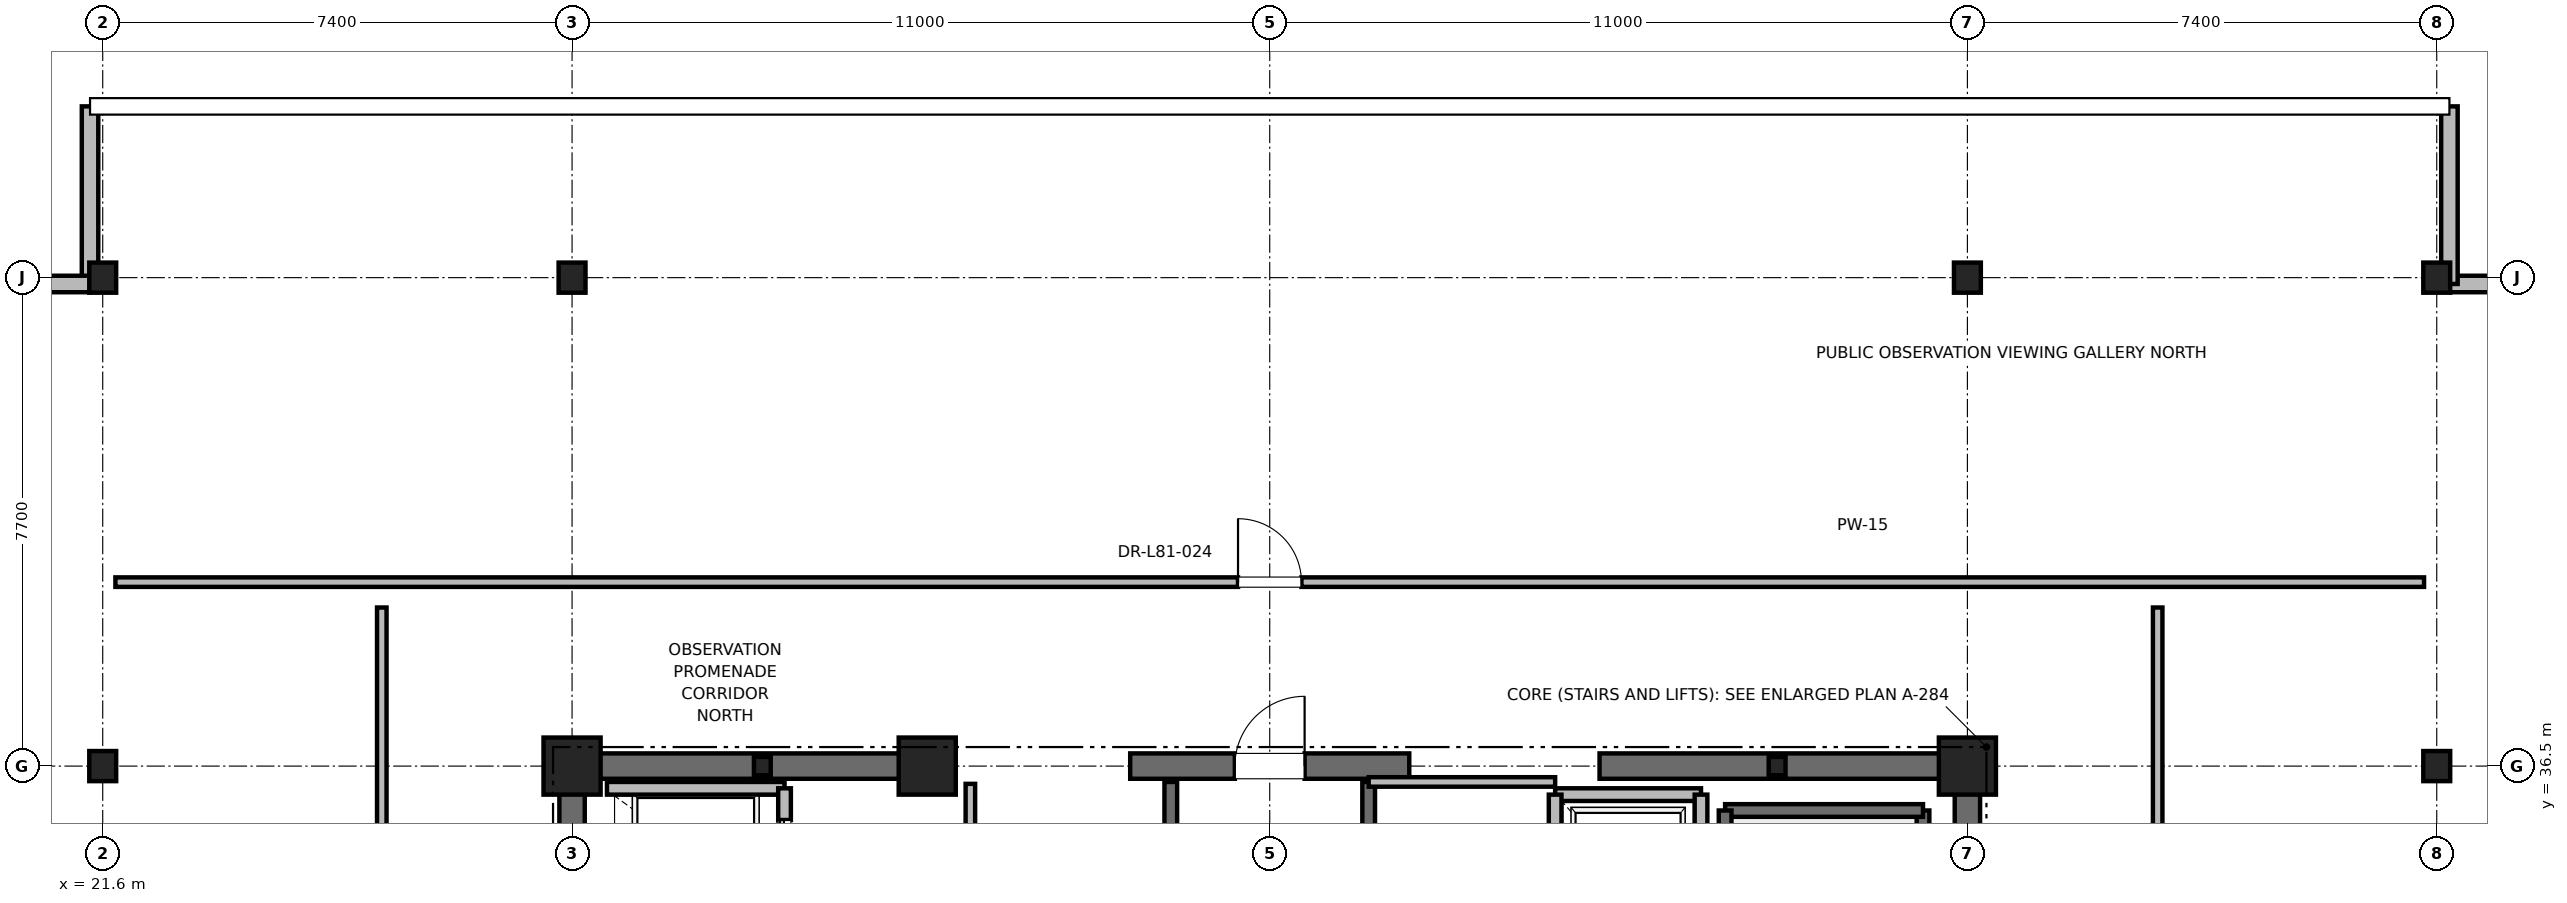
"""IFC4 building model, lengths in metres.
Left out: names, types, materials, properties, quantities, classifications, styles, units other than length and angle.
Written with IfcOpenShell. Run it as: python <this file> out.ifc"""

import sys

from ifc_helpers import new_model, si_unit, direction, frame, frame_2d, origin, origin_2d, place, context, subcontext, project, spatial, rectangle, i_section, extrude, element, fill, save


model = new_model("IFC4")
c1 = context("Model", 3, precision=1e-05, world=origin(), true_north=direction((0.0, 1.0)))
c2 = subcontext(c1, "Body", "Model", "MODEL_VIEW")
j1 = project(units=[si_unit("LENGTHUNIT", "METRE"), si_unit("PLANEANGLEUNIT", "RADIAN")], contexts=[c1])
p1 = place(None, origin())
s1 = spatial("IfcSite", under=j1, at=p1, CompositionType="ELEMENT")
p2 = place(p1, origin())
s2 = spatial("IfcBuilding", under=s1, at=p2, CompositionType="ELEMENT")
p3 = place(p2, frame((0.0, 0.0, 348.8)))
s3 = spatial("IfcBuildingStorey", under=s2, at=p3, CompositionType="ELEMENT", Elevation=348.8)
for number, where, z_axis, x_axis in (
    (1, (29.0, 44.2, 0.0), (0.0, 0.0, 1.0), (1.0, 0.0, 0.0)),
    (2, (51.0, 44.2, 0.0), (0.0, 0.0, 1.0), (1.0, 0.0, 0.0)),
    (3, (21.6, 36.5, 0.0), (0.0, 0.0, 1.0), (1.0, 0.0, 0.0)),
    (4, (58.4, 36.5, 0.0), (0.0, 0.0, 1.0), (1.0, 0.0, 0.0)),
    (5, (21.6, 44.2, 0.0), (0.0, 0.0, 1.0), (1.0, 0.0, 0.0)),
    (6, (58.4, 44.2, 0.0), (0.0, 0.0, 1.0), (1.0, 0.0, 0.0)),
):
    element("IfcColumn", number, at=place(p3, frame(where, z_axis=z_axis, x_axis=x_axis)), inside=s3, PredefinedType="COLUMN", context=c2, shape_type="SweptSolid", body=[
        extrude(i_section(OverallWidth=0.424, OverallDepth=0.475, WebThickness=0.048, FlangeThickness=0.077, FilletRadius=0.015, at=origin_2d()), origin(), (0.0, 0.0, 1.0), 5.5),
    ])
for number, where, z_axis, x_axis in (
    (7, (29.0, 36.5, 0.0), (0.0, 0.0, 1.0), (1.0, 0.0, 0.0)),
    (8, (51.0, 36.5, 0.0), (0.0, 0.0, 1.0), (1.0, 0.0, 0.0)),
    (9, (34.6, 36.5, 0.0), (0.0, 0.0, 1.0), (1.0, 0.0, 0.0)),
):
    element("IfcColumn", number, at=place(p3, frame(where, z_axis=z_axis, x_axis=x_axis)), inside=s3, PredefinedType="PILASTER", context=c2, shape_type="SweptSolid", body=[
        extrude(rectangle(XDim=0.9, YDim=0.9, at=origin_2d()), origin(), (0.0, 0.0, 1.0), 5.5),
    ])
for number, where, z_axis, x_axis in (
    (10, (32.0, 36.5, 0.0), (0.0, 0.0, 1.0), (1.0, 0.0, 0.0)),
    (11, (48.0, 36.5, 0.0), (0.0, 0.0, 1.0), (1.0, 0.0, 0.0)),
):
    element("IfcColumn", number, at=place(p3, frame(where, z_axis=z_axis, x_axis=x_axis)), inside=s3, PredefinedType="COLUMN", context=c2, shape_type="SweptSolid", body=[
        extrude(i_section(OverallWidth=0.265, OverallDepth=0.289, WebThickness=0.019, FlangeThickness=0.032, FilletRadius=0.013, at=origin_2d()), origin(), (0.0, 0.0, 1.0), 5.5),
    ])
p4 = place(p3, frame((29.0, 36.5, 0.0), z_axis=(0.0, 0.0, 1.0), x_axis=(1.0, 0.0, 0.0)))
e12 = element("IfcWall", 12, at=p4, inside=s3, PredefinedType="SHEAR", context=c2, shape_type="SweptSolid", body=[
    extrude(rectangle(XDim=5.8, YDim=0.4, at=frame_2d((2.9, 0.0))), origin(), (0.0, 0.0, 1.0), 5.2),
])
p5 = place(p3, frame((37.8, 36.5, 0.0), z_axis=(0.0, 0.0, 1.0), x_axis=(1.0, 0.0, 0.0)))
e13 = element("IfcWall", 13, at=p5, inside=s3, PredefinedType="SHEAR", context=c2, shape_type="SweptSolid", body=[
    extrude(rectangle(XDim=4.4, YDim=0.4, at=frame_2d((2.2, 0.0))), origin(), (0.0, 0.0, 1.0), 5.2),
])
p6 = place(p5, frame((1.65, 0.0, 0.0)))
e14 = element("IfcOpeningElement", 14, at=p6, cuts=e13, PredefinedType="OPENING", context=c2, shape_type="SweptSolid", body=[
    extrude(rectangle(XDim=1.1, YDim=2.15, at=frame_2d((0.55, 1.075))), frame((0.0, 0.2, 0.0), z_axis=(0.0, -1.0, 0.0), x_axis=(1.0, 0.0, 0.0)), (0.0, 0.0, 1.0), 0.4),
])
for number, where, z_axis, x_axis in (
    (15, (45.2, 36.5, 0.0), (0.0, 0.0, 1.0), (1.0, 0.0, 0.0)),
    (16, (29.0, 30.7, 0.0), (0.0, 0.0, 1.0), (0.0, 1.0, 0.0)),
):
    element("IfcWall", number, at=place(p3, frame(where, z_axis=z_axis, x_axis=x_axis)), inside=s3, PredefinedType="SHEAR", context=c2, shape_type="SweptSolid", body=[
        extrude(rectangle(XDim=5.8, YDim=0.4, at=frame_2d((2.9, 0.0))), origin(), (0.0, 0.0, 1.0), 5.2),
    ])
p7 = place(p3, frame((51.0, 27.7, 0.0), z_axis=(0.0, 0.0, 1.0), x_axis=(0.0, 1.0, 0.0)))
e17 = element("IfcWall", 17, at=p7, inside=s3, PredefinedType="SHEAR", context=c2, shape_type="SweptSolid", body=[
    extrude(rectangle(XDim=8.8, YDim=0.4, at=frame_2d((4.4, 0.0))), origin(), (0.0, 0.0, 1.0), 5.2),
])
p8 = place(p3, frame((61.8, 44.1, 0.0), z_axis=(0.0, 0.0, 1.0), x_axis=(-1.0, 0.0, 0.0)))
e18 = element("IfcWall", 18, at=p8, inside=s3, PredefinedType="PARAPET", context=c2, shape_type="SweptSolid", body=[
    extrude(rectangle(XDim=3.2, YDim=0.26, at=frame_2d((1.6, 0.0))), origin(), (0.0, 0.0, 1.0), 4.635),
])
p9 = place(p8, frame((0.9, 0.0, 0.85)))
e19 = element("IfcOpeningElement", 19, at=p9, cuts=e18, PredefinedType="OPENING", context=c2, shape_type="SweptSolid", body=[
    extrude(rectangle(XDim=1.4, YDim=2.0, at=frame_2d((0.7, 1.0))), frame((0.0, 0.13, 0.0), z_axis=(0.0, -1.0, 0.0), x_axis=(1.0, 0.0, 0.0)), (0.0, 0.0, 1.0), 0.26),
])
for number, where, z_axis, x_axis in (
    (20, (58.6, 44.1, 0.0), (0.0, 0.0, 1.0), (0.0, 1.0, 0.0)),
    (21, (21.4, 46.9, 0.0), (0.0, 0.0, 1.0), (0.0, -1.0, 0.0)),
):
    element("IfcWall", number, at=place(p3, frame(where, z_axis=z_axis, x_axis=x_axis)), inside=s3, PredefinedType="PARAPET", context=c2, shape_type="SweptSolid", body=[
        extrude(rectangle(XDim=2.8, YDim=0.26, at=frame_2d((1.4, 0.0))), origin(), (0.0, 0.0, 1.0), 4.635),
    ])
p10 = place(p3, frame((21.4, 44.1, 0.0), z_axis=(0.0, 0.0, 1.0), x_axis=(-1.0, 0.0, 0.0)))
e22 = element("IfcWall", 22, at=p10, inside=s3, PredefinedType="PARAPET", context=c2, shape_type="SweptSolid", body=[
    extrude(rectangle(XDim=3.2, YDim=0.26, at=frame_2d((1.6, 0.0))), origin(), (0.0, 0.0, 1.0), 4.635),
])
p11 = place(p3, frame((50.3, 27.65, 0.0), z_axis=(0.0, 0.0, 1.0), x_axis=(0.0, 1.0, 0.0)))
e23 = element("IfcWall", 23, at=p11, inside=s3, PredefinedType="SOLIDWALL", context=c2, shape_type="SweptSolid", body=[
    extrude(rectangle(XDim=8.15, YDim=0.2, at=frame_2d((4.075, 0.0))), origin(), (0.0, 0.0, 1.0), 5.2),
])
p12 = place(p3, frame((47.18, 35.8, 0.0), z_axis=(0.0, 0.0, 1.0), x_axis=(1.0, 0.0, 0.0)))
e24 = element("IfcWall", 24, at=p12, inside=s3, PredefinedType="SOLIDWALL", context=c2, shape_type="SweptSolid", body=[
    extrude(rectangle(XDim=3.12, YDim=0.2, at=frame_2d((1.56, 0.0))), origin(), (0.0, 0.0, 1.0), 5.2),
])
p13 = place(p3, frame((47.18, 27.62, 0.0), z_axis=(0.0, 0.0, 1.0), x_axis=(0.0, 1.0, 0.0)))
e25 = element("IfcWall", 25, at=p13, inside=s3, PredefinedType="SOLIDWALL", context=c2, shape_type="SweptSolid", body=[
    extrude(rectangle(XDim=8.18, YDim=0.2, at=frame_2d((4.09, 0.0))), origin(), (0.0, 0.0, 1.0), 5.2),
])
p14 = place(p3, frame((38.44, 27.38, 0.0), z_axis=(0.0, 0.0, 1.0), x_axis=(0.0, 1.0, 0.0)))
e26 = element("IfcWall", 26, at=p14, inside=s3, PredefinedType="SOLIDWALL", context=c2, shape_type="SweptSolid", body=[
    extrude(rectangle(XDim=8.87, YDim=0.2, at=frame_2d((4.435, 0.0))), origin(), (0.0, 0.0, 1.0), 5.2),
])
p15 = place(p3, frame((41.56, 27.68, 0.0), z_axis=(0.0, 0.0, 1.0), x_axis=(0.0, 1.0, 0.0)))
e27 = element("IfcWall", 27, at=p15, inside=s3, PredefinedType="SOLIDWALL", context=c2, shape_type="SweptSolid", body=[
    extrude(rectangle(XDim=8.57, YDim=0.2, at=frame_2d((4.285, 0.0))), origin(), (0.0, 0.0, 1.0), 5.2),
])
p16 = place(p3, frame((32.35, 36.15, 0.0), z_axis=(0.0, 0.0, 1.0), x_axis=(-1.0, 0.0, 0.0)))
e28 = element("IfcWall", 28, at=p16, inside=s3, PredefinedType="SOLIDWALL", context=c2, shape_type="SweptSolid", body=[
    extrude(rectangle(XDim=2.8, YDim=0.2, at=frame_2d((1.4, 0.0))), origin(), (0.0, 0.0, 1.0), 4.635),
])
p17 = place(p3, frame((32.35, 34.05, 0.0), z_axis=(0.0, 0.0, 1.0), x_axis=(0.0, 1.0, 0.0)))
e29 = element("IfcWall", 29, at=p17, inside=s3, PredefinedType="SOLIDWALL", context=c2, shape_type="SweptSolid", body=[
    extrude(rectangle(XDim=2.1, YDim=0.2, at=frame_2d((1.05, 0.0))), origin(), (0.0, 0.0, 1.0), 5.2),
])
p18 = place(p17, frame((0.5, 0.0, 0.0)))
e30 = element("IfcOpeningElement", 30, at=p18, cuts=e29, PredefinedType="OPENING", context=c2, shape_type="SweptSolid", body=[
    extrude(rectangle(XDim=1.1, YDim=2.2, at=frame_2d((0.55, 1.1))), frame((0.0, 0.1, 0.0), z_axis=(0.0, -1.0, 0.0), x_axis=(1.0, 0.0, 0.0)), (0.0, 0.0, 1.0), 0.2),
])
p19 = place(p3, frame((46.8, 36.05, 0.0), z_axis=(0.0, 0.0, 1.0), x_axis=(-1.0, 0.0, 0.0)))
e31 = element("IfcWall", 31, at=p19, inside=s3, PredefinedType="SOLIDWALL", context=c2, shape_type="SweptSolid", body=[
    extrude(rectangle(XDim=2.3, YDim=0.2, at=frame_2d((1.15, 0.0))), origin(), (0.0, 0.0, 1.0), 4.28),
])
p20 = place(p3, frame((44.5, 36.05, 0.0), z_axis=(0.0, 0.0, 1.0), x_axis=(0.0, -1.0, 0.0)))
e32 = element("IfcWall", 32, at=p20, inside=s3, PredefinedType="SOLIDWALL", context=c2, shape_type="SweptSolid", body=[
    extrude(rectangle(XDim=2.6, YDim=0.2, at=frame_2d((1.3, 0.0))), origin(), (0.0, 0.0, 1.0), 4.28),
])
p21 = place(p3, frame((46.8, 33.45, 0.0), z_axis=(0.0, 0.0, 1.0), x_axis=(0.0, 1.0, 0.0)))
e33 = element("IfcWall", 33, at=p21, inside=s3, PredefinedType="SOLIDWALL", context=c2, shape_type="SweptSolid", body=[
    extrude(rectangle(XDim=2.6, YDim=0.2, at=frame_2d((1.3, 0.0))), origin(), (0.0, 0.0, 1.0), 5.2),
])
p22 = place(p3, frame((35.28, 33.95, 0.0), z_axis=(0.0, 0.0, 1.0), x_axis=(0.0, 1.0, 0.0)))
e34 = element("IfcWall", 34, at=p22, inside=s3, PredefinedType="PARTITIONING", context=c2, shape_type="SweptSolid", body=[
    extrude(rectangle(XDim=2.27, YDim=0.15, at=frame_2d((1.135, 0.0))), origin(), (0.0, 0.0, 1.0), 2.85),
])
p23 = place(p22, frame((0.66, 0.0, 0.0)))
e35 = element("IfcOpeningElement", 35, at=p23, cuts=e34, PredefinedType="OPENING", context=c2, shape_type="SweptSolid", body=[
    extrude(rectangle(XDim=0.95, YDim=2.15, at=frame_2d((0.475, 1.075))), frame((0.0, 0.075, 0.0), z_axis=(0.0, -1.0, 0.0), x_axis=(1.0, 0.0, 0.0)), (0.0, 0.0, 1.0), 0.15),
])
p24 = place(p3, frame((41.56, 36.25, 0.0), z_axis=(0.0, 0.0, 1.0), x_axis=(1.0, 0.0, 0.0)))
e36 = element("IfcWall", 36, at=p24, inside=s3, PredefinedType="PARTITIONING", context=c2, shape_type="SweptSolid", body=[
    extrude(rectangle(XDim=2.94, YDim=0.15, at=frame_2d((1.47, 0.0))), origin(), (0.0, 0.0, 1.0), 2.85),
])
p25 = place(p3, frame((21.8, 39.4, 0.0), z_axis=(0.0, 0.0, 1.0), x_axis=(1.0, 0.0, 0.0)))
e37 = element("IfcWall", 37, at=p25, inside=s3, PredefinedType="PARTITIONING", context=c2, shape_type="SweptSolid", body=[
    extrude(rectangle(XDim=36.4, YDim=0.15, at=frame_2d((18.2, 0.0))), origin(), (0.0, 0.0, 1.0), 2.85),
])
p26 = place(p25, frame((17.7, 0.0, 0.0)))
e38 = element("IfcOpeningElement", 38, at=p26, cuts=e37, PredefinedType="OPENING", context=c2, shape_type="SweptSolid", body=[
    extrude(rectangle(XDim=1.0, YDim=2.15, at=frame_2d((0.5, 1.075))), frame((0.0, 0.075, 0.0), z_axis=(0.0, -1.0, 0.0), x_axis=(1.0, 0.0, 0.0)), (0.0, 0.0, 1.0), 0.15),
])
p27 = place(p3, frame((26.0, 27.57, 0.0), z_axis=(0.0, 0.0, 1.0), x_axis=(0.0, 1.0, 0.0)))
e39 = element("IfcWall", 39, at=p27, inside=s3, PredefinedType="PARTITIONING", context=c2, shape_type="SweptSolid", body=[
    extrude(rectangle(XDim=11.43, YDim=0.15, at=frame_2d((5.715, 0.0))), origin(), (0.0, 0.0, 1.0), 2.85),
])
p28 = place(p27, frame((3.915, 0.0, 0.0)))
e40 = element("IfcOpeningElement", 40, at=p28, cuts=e39, PredefinedType="OPENING", context=c2, shape_type="SweptSolid", body=[
    extrude(rectangle(XDim=1.0, YDim=2.15, at=frame_2d((0.5, 1.075))), frame((0.0, 0.075, 0.0), z_axis=(0.0, -1.0, 0.0), x_axis=(1.0, 0.0, 0.0)), (0.0, 0.0, 1.0), 0.15),
])
p29 = place(p3, frame((54.0, 16.0, 0.0), z_axis=(0.0, 0.0, 1.0), x_axis=(0.0, 1.0, 0.0)))
e41 = element("IfcWall", 41, at=p29, inside=s3, PredefinedType="PARTITIONING", context=c2, shape_type="SweptSolid", body=[
    extrude(rectangle(XDim=23.0, YDim=0.15, at=frame_2d((11.5, 0.0))), origin(), (0.0, 0.0, 1.0), 2.85),
])
p30 = place(p29, frame((11.0, 0.0, 0.0)))
e42 = element("IfcOpeningElement", 42, at=p30, cuts=e41, PredefinedType="OPENING", context=c2, shape_type="SweptSolid", body=[
    extrude(rectangle(XDim=1.0, YDim=2.15, at=frame_2d((0.5, 1.075))), frame((0.0, 0.075, 0.0), z_axis=(0.0, -1.0, 0.0), x_axis=(1.0, 0.0, 0.0)), (0.0, 0.0, 1.0), 0.15),
])
p31 = place(p6, origin())
e43 = element("IfcDoor", 43, at=p31, inside=s3, OperationType="SINGLE_SWING_RIGHT", PredefinedType="DOOR", context=c2, shape_type="SweptSolid", body=[
    extrude(rectangle(XDim=1.1, YDim=2.15, at=frame_2d((0.55, 1.075))), frame((0.0, 0.025, 0.0), z_axis=(0.0, -1.0, 0.0), x_axis=(1.0, 0.0, 0.0)), (0.0, 0.0, 1.0), 0.05),
])
fill(e14, e43)
p32 = place(p18, origin())
e44 = element("IfcDoor", 44, at=p32, inside=s3, OperationType="SLIDING_TO_RIGHT", PredefinedType="DOOR", context=c2, shape_type="SweptSolid", body=[
    extrude(rectangle(XDim=1.1, YDim=2.2, at=frame_2d((0.55, 1.1))), frame((0.0, 0.025, 0.0), z_axis=(0.0, -1.0, 0.0), x_axis=(1.0, 0.0, 0.0)), (0.0, 0.0, 1.0), 0.05),
])
fill(e30, e44)
p33 = place(p26, origin())
e45 = element("IfcDoor", 45, at=p33, inside=s3, OperationType="SINGLE_SWING_LEFT", PredefinedType="DOOR", context=c2, shape_type="SweptSolid", body=[
    extrude(rectangle(XDim=1.0, YDim=2.15, at=frame_2d((0.5, 1.075))), frame((0.0, 0.025, 0.0), z_axis=(0.0, -1.0, 0.0), x_axis=(1.0, 0.0, 0.0)), (0.0, 0.0, 1.0), 0.05),
])
fill(e38, e45)
save(model, sys.argv[1])
